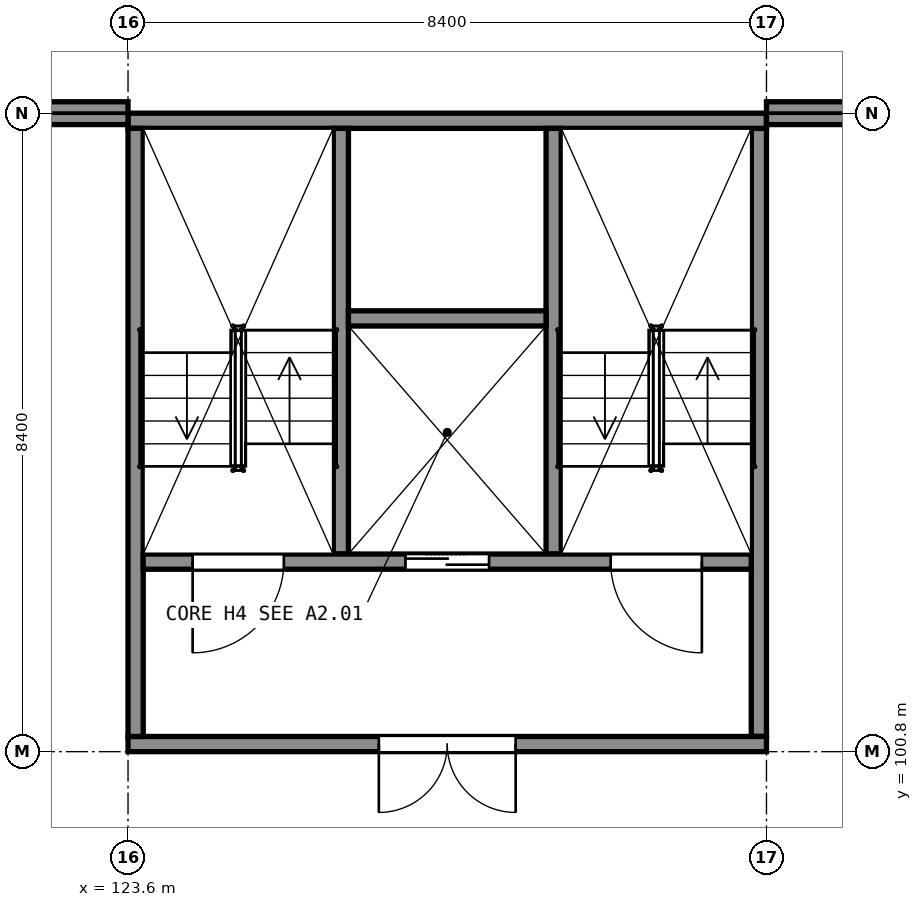
"""IFC4 building model, lengths in metres.
Left out: names, types, materials, properties, quantities, classifications, styles, units other than length and angle.
Written with IfcOpenShell. Run it as: python <this file> out.ifc"""

import sys

from ifc_helpers import new_model, si_unit, direction, frame, frame_2d, origin, place, context, subcontext, project, spatial, rectangle, extrude, element, fill, save


model = new_model("IFC4")
c1 = context("Model", 3, precision=1e-05, world=origin(), true_north=direction((0.0, 1.0)))
c2 = subcontext(c1, "Body", "Model", "MODEL_VIEW")
j1 = project(units=[si_unit("LENGTHUNIT", "METRE"), si_unit("PLANEANGLEUNIT", "RADIAN")], contexts=[c1])
p1 = place(None, origin())
s1 = spatial("IfcSite", under=j1, at=p1, CompositionType="ELEMENT")
p2 = place(p1, origin())
s2 = spatial("IfcBuilding", under=s1, at=p2, CompositionType="ELEMENT")
p3 = place(p2, frame((0.0, 0.0, 20.0)))
s3 = spatial("IfcBuildingStorey", under=s2, at=p3, CompositionType="ELEMENT", Elevation=20.0)
p4 = place(p3, frame((123.6, 100.9, 0.0), z_axis=(0.0, 0.0, 1.0), x_axis=(1.0, 0.0, 0.0)))
e1 = element("IfcWall", 1, at=p4, inside=s3, PredefinedType="SHEAR", context=c2, shape_type="SweptSolid", body=[
    extrude(rectangle(XDim=8.4, YDim=0.2, at=frame_2d((4.2, 0.0))), origin(), (0.0, 0.0, 1.0), 5.0),
])
p5 = place(p4, frame((3.3, 0.0, 0.0)))
e2 = element("IfcOpeningElement", 2, at=p5, cuts=e1, PredefinedType="OPENING", context=c2, shape_type="SweptSolid", body=[
    extrude(rectangle(XDim=1.8, YDim=2.1, at=frame_2d((0.9, 1.05))), frame((0.0, 0.11, 0.0), z_axis=(0.0, -1.0, 0.0), x_axis=(1.0, 0.0, 0.0)), (0.0, 0.0, 1.0), 0.22),
])
p6 = place(p3, frame((123.6, 109.1, 0.0), z_axis=(0.0, 0.0, 1.0), x_axis=(1.0, 0.0, 0.0)))
e3 = element("IfcWall", 3, at=p6, inside=s3, PredefinedType="SHEAR", context=c2, shape_type="SweptSolid", body=[
    extrude(rectangle(XDim=8.4, YDim=0.2, at=frame_2d((4.2, 0.0))), origin(), (0.0, 0.0, 1.0), 5.0),
])
for number, where, z_axis, x_axis in (
    (4, (123.7, 101.0, 0.0), (0.0, 0.0, 1.0), (0.0, 1.0, 0.0)),
    (5, (131.9, 101.0, 0.0), (0.0, 0.0, 1.0), (0.0, 1.0, 0.0)),
):
    element("IfcWall", number, at=place(p3, frame(where, z_axis=z_axis, x_axis=x_axis)), inside=s3, PredefinedType="SHEAR", context=c2, shape_type="SweptSolid", body=[
        extrude(rectangle(XDim=8.0, YDim=0.2, at=frame_2d((4.0, 0.0))), origin(), (0.0, 0.0, 1.0), 5.0),
    ])
p7 = place(p3, frame((123.8, 103.3, 0.0), z_axis=(0.0, 0.0, 1.0), x_axis=(1.0, 0.0, 0.0)))
e6 = element("IfcWall", 6, at=p7, inside=s3, PredefinedType="SHEAR", context=c2, shape_type="SweptSolid", body=[
    extrude(rectangle(XDim=8.0, YDim=0.2, at=frame_2d((4.0, 0.0))), origin(), (0.0, 0.0, 1.0), 5.0),
])
p8 = place(p7, frame((0.65, 0.0, 0.0)))
e7 = element("IfcOpeningElement", 7, at=p8, cuts=e6, PredefinedType="OPENING", context=c2, shape_type="SweptSolid", body=[
    extrude(rectangle(XDim=1.2, YDim=2.1, at=frame_2d((0.6, 1.05))), frame((0.0, 0.11, 0.0), z_axis=(0.0, -1.0, 0.0), x_axis=(1.0, 0.0, 0.0)), (0.0, 0.0, 1.0), 0.22),
])
p9 = place(p7, frame((6.15, 0.0, 0.0)))
e8 = element("IfcOpeningElement", 8, at=p9, cuts=e6, PredefinedType="OPENING", context=c2, shape_type="SweptSolid", body=[
    extrude(rectangle(XDim=1.2, YDim=2.1, at=frame_2d((0.6, 1.05))), frame((0.0, 0.11, 0.0), z_axis=(0.0, -1.0, 0.0), x_axis=(1.0, 0.0, 0.0)), (0.0, 0.0, 1.0), 0.22),
])
p10 = place(p7, frame((3.45, 0.0, 0.0)))
e9 = element("IfcOpeningElement", 9, at=p10, cuts=e6, PredefinedType="OPENING", context=c2, shape_type="SweptSolid", body=[
    extrude(rectangle(XDim=1.1, YDim=2.1, at=frame_2d((0.55, 1.05))), frame((0.0, 0.11, 0.0), z_axis=(0.0, -1.0, 0.0), x_axis=(1.0, 0.0, 0.0)), (0.0, 0.0, 1.0), 0.22),
])
for number, where, z_axis, x_axis in (
    (10, (126.4, 103.4, 0.0), (0.0, 0.0, 1.0), (0.0, 1.0, 0.0)),
    (11, (129.2, 103.4, 0.0), (0.0, 0.0, 1.0), (0.0, 1.0, 0.0)),
):
    element("IfcWall", number, at=place(p3, frame(where, z_axis=z_axis, x_axis=x_axis)), inside=s3, PredefinedType="SHEAR", context=c2, shape_type="SweptSolid", body=[
        extrude(rectangle(XDim=5.6, YDim=0.2, at=frame_2d((2.8, 0.0))), origin(), (0.0, 0.0, 1.0), 5.0),
    ])
p11 = place(p3, frame((126.5, 106.5, 0.0), z_axis=(0.0, 0.0, 1.0), x_axis=(1.0, 0.0, 0.0)))
e12 = element("IfcWall", 12, at=p11, inside=s3, PredefinedType="SHEAR", context=c2, shape_type="SweptSolid", body=[
    extrude(rectangle(XDim=2.6, YDim=0.2, at=frame_2d((1.3, 0.0))), origin(), (0.0, 0.0, 1.0), 5.0),
])
p12 = place(p3, frame((132.0, 109.2, 0.0), z_axis=(0.0, 0.0, 1.0), x_axis=(1.0, 0.0, 0.0)))
e13 = element("IfcWall", 13, at=p12, inside=s3, PredefinedType="SOLIDWALL", context=c2, shape_type="SweptSolid", body=[
    extrude(rectangle(XDim=8.4, YDim=0.3, at=frame_2d((4.2, 0.0))), origin(), (0.0, 0.0, 1.0), 3.94),
])
p13 = place(p3, frame((115.55, 109.2, 0.0), z_axis=(0.0, 0.0, 1.0), x_axis=(1.0, 0.0, 0.0)))
e14 = element("IfcWall", 14, at=p13, inside=s3, PredefinedType="SOLIDWALL", context=c2, shape_type="SweptSolid", body=[
    extrude(rectangle(XDim=8.05, YDim=0.3, at=frame_2d((4.025, 0.0))), origin(), (0.0, 0.0, 1.0), 3.94),
])
p14 = place(p5, origin())
e15 = element("IfcDoor", 15, at=p14, inside=s3, OperationType="DOUBLE_DOOR_SINGLE_SWING", PredefinedType="DOOR", context=c2, shape_type="SweptSolid", body=[
    extrude(rectangle(XDim=1.8, YDim=2.1, at=frame_2d((0.9, 1.05))), frame((0.0, 0.025, 0.0), z_axis=(0.0, -1.0, 0.0), x_axis=(1.0, 0.0, 0.0)), (0.0, 0.0, 1.0), 0.05),
])
fill(e2, e15)
p15 = place(p8, origin())
e16 = element("IfcDoor", 16, at=p15, inside=s3, OperationType="SINGLE_SWING_LEFT", PredefinedType="DOOR", context=c2, shape_type="SweptSolid", body=[
    extrude(rectangle(XDim=1.2, YDim=2.1, at=frame_2d((0.6, 1.05))), frame((0.0, 0.025, 0.0), z_axis=(0.0, -1.0, 0.0), x_axis=(1.0, 0.0, 0.0)), (0.0, 0.0, 1.0), 0.05),
])
fill(e7, e16)
p16 = place(p9, origin())
e17 = element("IfcDoor", 17, at=p16, inside=s3, OperationType="SINGLE_SWING_RIGHT", PredefinedType="DOOR", context=c2, shape_type="SweptSolid", body=[
    extrude(rectangle(XDim=1.2, YDim=2.1, at=frame_2d((0.6, 1.05))), frame((0.0, 0.025, 0.0), z_axis=(0.0, -1.0, 0.0), x_axis=(1.0, 0.0, 0.0)), (0.0, 0.0, 1.0), 0.05),
])
fill(e8, e17)
p17 = place(p10, origin())
e18 = element("IfcDoor", 18, at=p17, inside=s3, OperationType="DOUBLE_DOOR_SLIDING", PredefinedType="DOOR", context=c2, shape_type="SweptSolid", body=[
    extrude(rectangle(XDim=1.1, YDim=2.1, at=frame_2d((0.55, 1.05))), frame((0.0, 0.025, 0.0), z_axis=(0.0, -1.0, 0.0), x_axis=(1.0, 0.0, 0.0)), (0.0, 0.0, 1.0), 0.05),
])
fill(e9, e18)
save(model, sys.argv[1])
